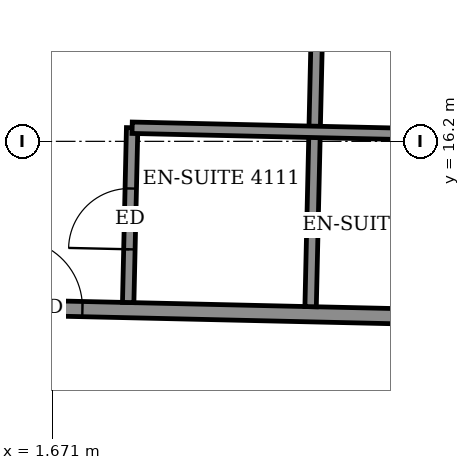
"""IFC4 building model, lengths in metres.
Left out: names, types, materials, properties, quantities, classifications, styles, units other than length and angle.
Written with IfcOpenShell. Run it as: python <this file> out.ifc"""

import sys

from ifc_helpers import new_model, si_unit, direction, frame, frame_2d, origin, place, context, subcontext, project, spatial, rectangle, extrude, element, fill, save


model = new_model("IFC4")
c1 = context("Model", 3, precision=1e-05, world=origin(), true_north=direction((0.0, 1.0)))
c2 = subcontext(c1, "Body", "Model", "MODEL_VIEW")
j1 = project(units=[si_unit("LENGTHUNIT", "METRE"), si_unit("PLANEANGLEUNIT", "RADIAN")], contexts=[c1])
p1 = place(None, origin())
s1 = spatial("IfcSite", under=j1, at=p1, CompositionType="ELEMENT")
p2 = place(p1, origin())
s2 = spatial("IfcBuilding", under=s1, at=p2, CompositionType="ELEMENT")
p3 = place(p2, frame((0.0, 0.0, 163.5)))
s3 = spatial("IfcBuildingStorey", under=s2, at=p3, CompositionType="ELEMENT", Elevation=163.5)
p4 = place(p3, frame((-21.279, 14.523, 0.0), z_axis=(0.0, 0.0, 1.0), x_axis=(0.999742669174, -0.02268469602, 0.0)))
e1 = element("IfcWall", 1, at=p4, inside=s3, PredefinedType="PARTITIONING", context=c2, shape_type="SweptSolid", body=[
    extrude(rectangle(XDim=40.639, YDim=0.2, at=frame_2d((20.319, 0.0))), origin(), (0.0, 0.0, 1.0), 3.05),
])
p5 = place(p4, frame((38.275, 0.0, 0.0)))
e2 = element("IfcOpeningElement", 2, at=p5, cuts=e1, PredefinedType="OPENING", context=c2, shape_type="SweptSolid", body=[
    extrude(rectangle(XDim=0.9, YDim=2.1, at=frame_2d((0.45, 1.05))), frame((0.0, 0.11, 0.0), z_axis=(0.0, -1.0, 0.0), x_axis=(1.0, 0.0, 0.0)), (0.0, 0.0, 1.0), 0.22),
])
p6 = place(p4, frame((31.475, 0.0, 0.0)))
e3 = element("IfcOpeningElement", 3, at=p6, cuts=e1, PredefinedType="OPENING", context=c2, shape_type="SweptSolid", body=[
    extrude(rectangle(XDim=0.9, YDim=2.1, at=frame_2d((0.45, 1.05))), frame((0.0, 0.11, 0.0), z_axis=(0.0, -1.0, 0.0), x_axis=(1.0, 0.0, 0.0)), (0.0, 0.0, 1.0), 0.22),
])
p7 = place(p4, frame((29.35, 0.0, 0.0)))
e4 = element("IfcOpeningElement", 4, at=p7, cuts=e1, PredefinedType="OPENING", context=c2, shape_type="SweptSolid", body=[
    extrude(rectangle(XDim=0.9, YDim=2.1, at=frame_2d((0.45, 1.05))), frame((0.0, 0.11, 0.0), z_axis=(0.0, -1.0, 0.0), x_axis=(1.0, 0.0, 0.0)), (0.0, 0.0, 1.0), 0.22),
])
p8 = place(p4, frame((22.45, 0.0, 0.0)))
e5 = element("IfcOpeningElement", 5, at=p8, cuts=e1, PredefinedType="OPENING", context=c2, shape_type="SweptSolid", body=[
    extrude(rectangle(XDim=0.9, YDim=2.1, at=frame_2d((0.45, 1.05))), frame((0.0, 0.11, 0.0), z_axis=(0.0, -1.0, 0.0), x_axis=(1.0, 0.0, 0.0)), (0.0, 0.0, 1.0), 0.22),
])
p9 = place(p4, frame((20.425, 0.0, 0.0)))
e6 = element("IfcOpeningElement", 6, at=p9, cuts=e1, PredefinedType="OPENING", context=c2, shape_type="SweptSolid", body=[
    extrude(rectangle(XDim=0.9, YDim=2.1, at=frame_2d((0.45, 1.05))), frame((0.0, 0.11, 0.0), z_axis=(0.0, -1.0, 0.0), x_axis=(1.0, 0.0, 0.0)), (0.0, 0.0, 1.0), 0.22),
])
p10 = place(p4, frame((13.575, 0.0, 0.0)))
e7 = element("IfcOpeningElement", 7, at=p10, cuts=e1, PredefinedType="OPENING", context=c2, shape_type="SweptSolid", body=[
    extrude(rectangle(XDim=0.9, YDim=2.1, at=frame_2d((0.45, 1.05))), frame((0.0, 0.11, 0.0), z_axis=(0.0, -1.0, 0.0), x_axis=(1.0, 0.0, 0.0)), (0.0, 0.0, 1.0), 0.22),
])
p11 = place(p4, frame((11.4, 0.0, 0.0)))
e8 = element("IfcOpeningElement", 8, at=p11, cuts=e1, PredefinedType="OPENING", context=c2, shape_type="SweptSolid", body=[
    extrude(rectangle(XDim=0.9, YDim=2.1, at=frame_2d((0.45, 1.05))), frame((0.0, 0.11, 0.0), z_axis=(0.0, -1.0, 0.0), x_axis=(1.0, 0.0, 0.0)), (0.0, 0.0, 1.0), 0.22),
])
p12 = place(p4, frame((1.575, 0.0, 0.0)))
e9 = element("IfcOpeningElement", 9, at=p12, cuts=e1, PredefinedType="OPENING", context=c2, shape_type="SweptSolid", body=[
    extrude(rectangle(XDim=1.0, YDim=2.1, at=frame_2d((0.5, 1.05))), frame((0.0, 0.11, 0.0), z_axis=(0.0, -1.0, 0.0), x_axis=(1.0, 0.0, 0.0)), (0.0, 0.0, 1.0), 0.22),
])
p13 = place(p4, frame((6.6, 0.0, 0.0)))
e10 = element("IfcOpeningElement", 10, at=p13, cuts=e1, PredefinedType="OPENING", context=c2, shape_type="SweptSolid", body=[
    extrude(rectangle(XDim=0.9, YDim=2.1, at=frame_2d((0.45, 1.05))), frame((0.0, 0.11, 0.0), z_axis=(0.0, -1.0, 0.0), x_axis=(1.0, 0.0, 0.0)), (0.0, 0.0, 1.0), 0.22),
])
p14 = place(p3, frame((2.667, 14.08, 0.0), z_axis=(0.0, 0.0, 1.0), x_axis=(0.022615284993, 0.999744241736, 0.0)))
e11 = element("IfcWall", 11, at=p14, inside=s3, PredefinedType="PARTITIONING", context=c2, shape_type="SweptSolid", body=[
    extrude(rectangle(XDim=2.299, YDim=0.15, at=frame_2d((1.15, 0.0))), origin(), (0.0, 0.0, 1.0), 3.05),
])
p15 = place(p14, frame((0.7, 0.0, 0.0)))
e12 = element("IfcOpeningElement", 12, at=p15, cuts=e11, PredefinedType="OPENING", context=c2, shape_type="SweptSolid", body=[
    extrude(rectangle(XDim=0.8, YDim=2.1, at=frame_2d((0.4, 1.05))), frame((0.0, 0.085, 0.0), z_axis=(0.0, -1.0, 0.0), x_axis=(1.0, 0.0, 0.0)), (0.0, 0.0, 1.0), 0.17),
])
p16 = place(p3, frame((5.067, 14.025, 0.0), z_axis=(0.0, 0.0, 1.0), x_axis=(0.022687855237, 0.999742597484, 0.0)))
e13 = element("IfcWall", 13, at=p16, inside=s3, PredefinedType="PARTITIONING", context=c2, shape_type="SweptSolid", body=[
    extrude(rectangle(XDim=5.951, YDim=0.15, at=frame_2d((2.975, 0.0))), origin(), (0.0, 0.0, 1.0), 2.55),
])
p17 = place(p3, frame((2.719, 16.379, 0.0), z_axis=(0.0, 0.0, 1.0), x_axis=(0.999742701292, -0.022683280499, 0.0)))
e14 = element("IfcWall", 14, at=p17, inside=s3, PredefinedType="PARTITIONING", context=c2, shape_type="SweptSolid", body=[
    extrude(rectangle(XDim=4.8, YDim=0.15, at=frame_2d((2.4, 0.0))), origin(), (0.0, 0.0, 1.0), 3.05),
])
p18 = place(p8, origin())
e15 = element("IfcDoor", 15, at=p18, inside=s3, OperationType="SINGLE_SWING_LEFT", PredefinedType="DOOR", context=c2, shape_type="SweptSolid", body=[
    extrude(rectangle(XDim=0.9, YDim=2.1, at=frame_2d((0.45, 1.05))), frame((0.0, 0.025, 0.0), z_axis=(0.0, -1.0, 0.0), x_axis=(1.0, 0.0, 0.0)), (0.0, 0.0, 1.0), 0.05),
])
fill(e5, e15)
p19 = place(p15, origin())
e16 = element("IfcDoor", 16, at=p19, inside=s3, OperationType="SINGLE_SWING_LEFT", PredefinedType="DOOR", context=c2, shape_type="SweptSolid", body=[
    extrude(rectangle(XDim=0.8, YDim=2.1, at=frame_2d((0.4, 1.05))), frame((0.0, 0.025, 0.0), z_axis=(0.0, -1.0, 0.0), x_axis=(1.0, 0.0, 0.0)), (0.0, 0.0, 1.0), 0.05),
])
fill(e12, e16)
save(model, sys.argv[1])
